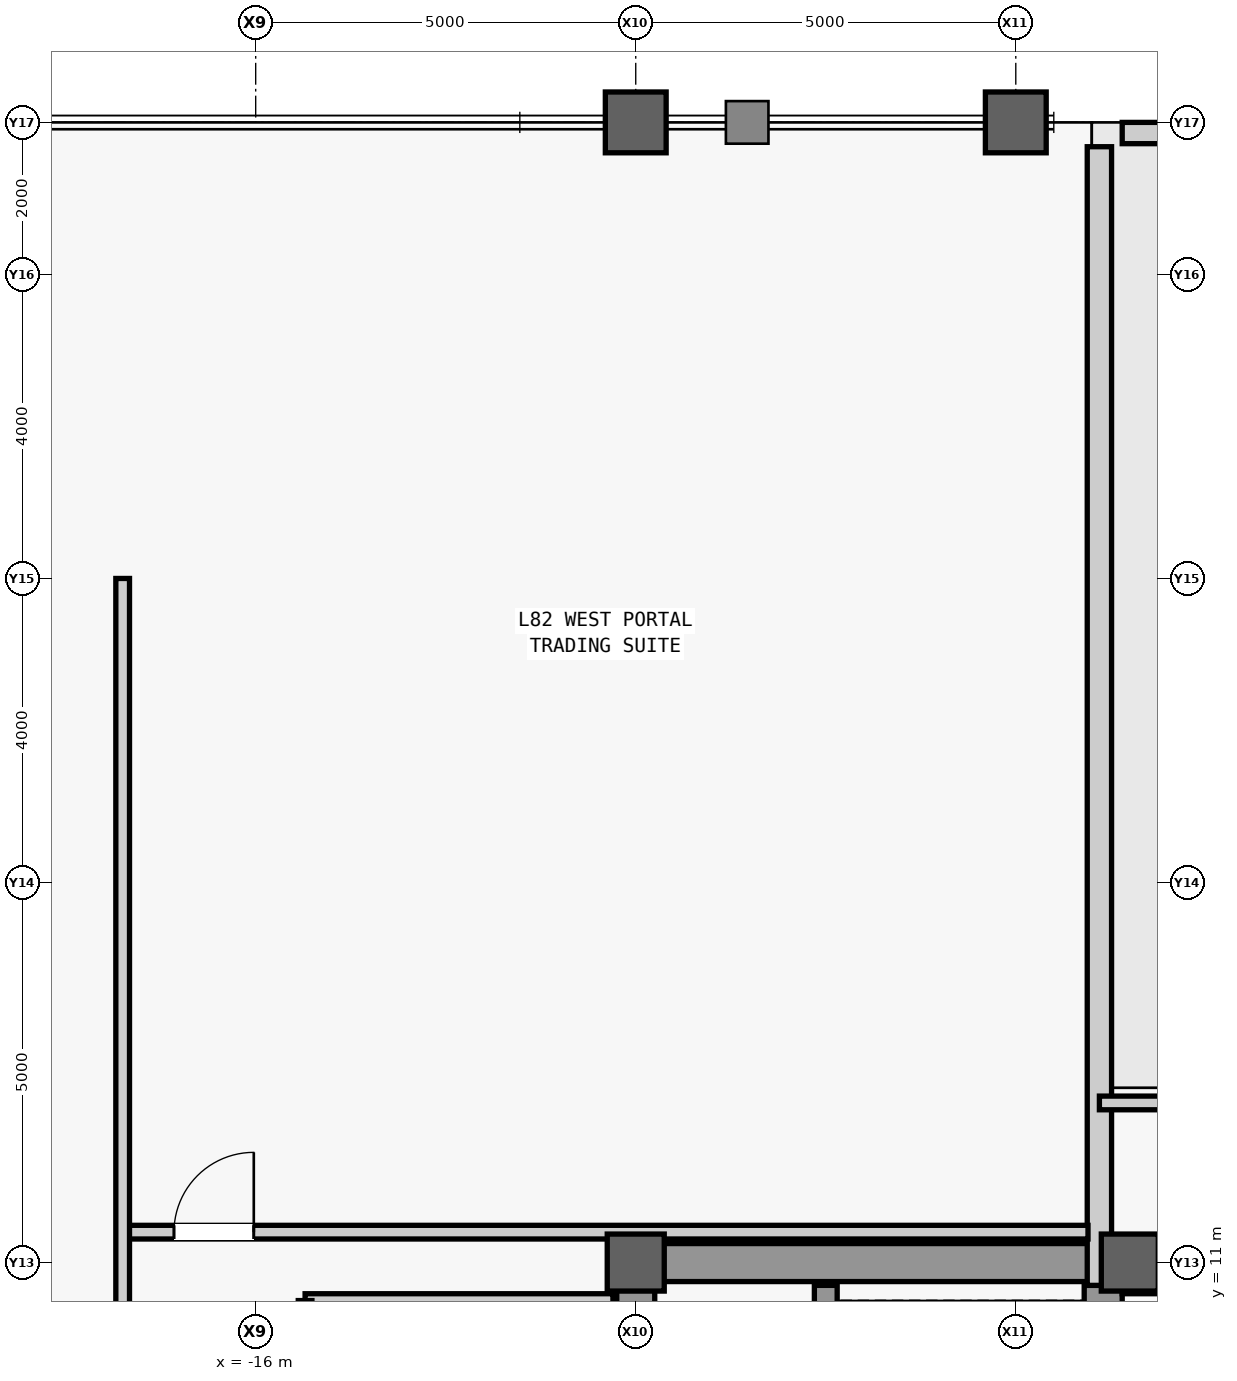
"""IFC4 building model, lengths in metres.
Left out: names, types, materials, properties, quantities, classifications, styles, units other than length and angle.
Written with IfcOpenShell. Run it as: python <this file> out.ifc"""

import sys

from ifc_helpers import new_model, si_unit, direction, frame, frame_2d, origin, origin_2d, place, context, subcontext, project, spatial, rectangle, hollow_rectangle, extrude, source, transform, mapped, element, fill, save


model = new_model("IFC4")
c1 = context("Model", 3, precision=1e-05, world=origin(), true_north=direction((0.0, 1.0)))
c2 = subcontext(c1, "Body", "Model", "MODEL_VIEW")
j1 = project(units=[si_unit("LENGTHUNIT", "METRE"), si_unit("PLANEANGLEUNIT", "RADIAN")], contexts=[c1])
p1 = place(None, origin())
s1 = spatial("IfcSite", under=j1, at=p1, CompositionType="ELEMENT")
p2 = place(p1, origin())
s2 = spatial("IfcBuilding", under=s1, at=p2, CompositionType="ELEMENT")
p3 = place(p2, frame((0.0, 0.0, 346.3)))
s3 = spatial("IfcBuildingStorey", under=s2, at=p3, CompositionType="ELEMENT", Elevation=346.3)
m1 = source(origin(), c2, "Body", "SweptSolid", [
    extrude(rectangle(XDim=22.0, YDim=0.5, at=frame_2d((11.0, 0.0))), origin(), (0.0, 0.0, 1.0), 3.74),
])
p4 = place(p3, frame((-11.0, -11.0, 0.0), z_axis=(0.0, 0.0, 1.0), x_axis=(0.0, 1.0, 0.0)))
e1 = element("IfcWall", 1, at=p4, inside=s3, PredefinedType="SHEAR", context=c2, shape_type="MappedRepresentation", body=[
    mapped(m1, transform((0.0, 0.0, 0.0), scale=1.0)),
])
m2 = source(origin(), c2, "Body", "SweptSolid", [
    extrude(rectangle(XDim=1.1, YDim=2.2, at=frame_2d((0.55, 1.1))), frame((0.0, 0.26, 0.0), z_axis=(0.0, -1.0, 0.0), x_axis=(1.0, 0.0, 0.0)), (0.0, 0.0, 1.0), 0.52),
])
p5 = place(p4, frame((0.8, 0.0, 0.0)))
e2 = element("IfcOpeningElement", 2, at=p5, cuts=e1, PredefinedType="OPENING", context=c2, shape_type="MappedRepresentation", body=[
    mapped(m2, transform((0.0, 0.0, 0.0), scale=1.0)),
])
p6 = place(p4, frame((12.5, 0.0, 0.0)))
e3 = element("IfcOpeningElement", 3, at=p6, cuts=e1, PredefinedType="OPENING", context=c2, shape_type="MappedRepresentation", body=[
    mapped(m2, transform((0.0, 0.0, 0.0), scale=1.0)),
])
m3 = source(origin(), c2, "Body", "SweptSolid", [
    extrude(rectangle(XDim=0.9, YDim=2.15, at=frame_2d((0.45, 1.075))), frame((0.0, 0.26, 0.0), z_axis=(0.0, -1.0, 0.0), x_axis=(1.0, 0.0, 0.0)), (0.0, 0.0, 1.0), 0.52),
])
p7 = place(p4, frame((6.85, 0.0, 0.0)))
e4 = element("IfcOpeningElement", 4, at=p7, cuts=e1, PredefinedType="OPENING", context=c2, shape_type="MappedRepresentation", body=[
    mapped(m3, transform((0.0, 0.0, 0.0), scale=1.0)),
])
m4 = source(origin(), c2, "Body", "SweptSolid", [
    extrude(rectangle(XDim=1.2, YDim=2.3, at=frame_2d((0.6, 1.15))), frame((0.0, 0.26, 0.0), z_axis=(0.0, -1.0, 0.0), x_axis=(1.0, 0.0, 0.0)), (0.0, 0.0, 1.0), 0.52),
])
p8 = place(p4, frame((14.6, 0.0, 0.0)))
e5 = element("IfcOpeningElement", 5, at=p8, cuts=e1, PredefinedType="OPENING", context=c2, shape_type="MappedRepresentation", body=[
    mapped(m4, transform((0.0, 0.0, 0.0), scale=1.0)),
])
p9 = place(p4, frame((18.2, 0.0, 0.0)))
e6 = element("IfcOpeningElement", 6, at=p9, cuts=e1, PredefinedType="OPENING", context=c2, shape_type="MappedRepresentation", body=[
    mapped(m4, transform((0.0, 0.0, 0.0), scale=1.0)),
])
m5 = source(origin(), c2, "Body", "SweptSolid", [
    extrude(rectangle(XDim=1.3, YDim=2.3, at=frame_2d((0.65, 1.15))), frame((0.0, 0.26, 0.0), z_axis=(0.0, -1.0, 0.0), x_axis=(1.0, 0.0, 0.0)), (0.0, 0.0, 1.0), 0.52),
])
p10 = place(p4, frame((2.7, 0.0, 0.0)))
e7 = element("IfcOpeningElement", 7, at=p10, cuts=e1, PredefinedType="OPENING", context=c2, shape_type="MappedRepresentation", body=[
    mapped(m5, transform((0.0, 0.0, 0.0), scale=1.0)),
])
m6 = source(origin(), c2, "Body", "SweptSolid", [
    extrude(rectangle(XDim=21.4, YDim=0.5, at=frame_2d((10.7, 0.0))), origin(), (0.0, 0.0, 1.0), 3.74),
])
p11 = place(p3, frame((-4.85, -10.7, 0.0), z_axis=(0.0, 0.0, 1.0), x_axis=(0.0, 1.0, 0.0)))
e8 = element("IfcWall", 8, at=p11, inside=s3, PredefinedType="SHEAR", context=c2, shape_type="MappedRepresentation", body=[
    mapped(m6, transform((0.0, 0.0, 0.0), scale=1.0)),
])
m7 = source(origin(), c2, "Body", "SweptSolid", [
    extrude(rectangle(XDim=5.9, YDim=0.5, at=frame_2d((2.95, 0.0))), origin(), (0.0, 0.0, 1.0), 3.74),
])
p12 = place(p3, frame((-10.75, 11.0, 0.0), z_axis=(0.0, 0.0, 1.0), x_axis=(1.0, 0.0, 0.0)))
e9 = element("IfcWall", 9, at=p12, inside=s3, PredefinedType="SHEAR", context=c2, shape_type="MappedRepresentation", body=[
    mapped(m7, transform((0.0, 0.0, 0.0), scale=1.0)),
])
m8 = source(origin(), c2, "Body", "SweptSolid", [
    extrude(rectangle(XDim=0.75, YDim=0.75, at=origin_2d()), origin(), (0.0, 0.0, 1.0), 4.0),
])
p13 = place(p3, frame((-11.0, 11.0, 0.0), z_axis=(0.0, 0.0, 1.0), x_axis=(1.0, 0.0, 0.0)))
e10 = element("IfcColumn", 10, at=p13, inside=s3, PredefinedType="COLUMN", context=c2, shape_type="MappedRepresentation", body=[
    mapped(m8, transform((0.0, 0.0, 0.0), scale=1.0)),
])
m9 = source(origin(), c2, "Body", "SweptSolid", [
    extrude(hollow_rectangle(XDim=0.8, YDim=0.8, WallThickness=0.045, at=origin_2d()), origin(), (0.0, 0.0, 1.0), 4.0),
])
for number, where, z_axis, x_axis in (
    (11, (-11.0, 26.0, 0.0), (0.0, 0.0, 1.0), (1.0, 0.0, 0.0)),
    (12, (-6.0, 26.0, 0.0), (0.0, 0.0, 1.0), (1.0, 0.0, 0.0)),
):
    element("IfcColumn", number, at=place(p3, frame(where, z_axis=z_axis, x_axis=x_axis)), inside=s3, PredefinedType="COLUMN", context=c2, shape_type="MappedRepresentation", body=[
        mapped(m9, transform((0.0, 0.0, 0.0), scale=1.0)),
    ])
p14 = place(p3, frame((-4.5, 11.0, 0.0), z_axis=(0.0, 0.0, 1.0), x_axis=(1.0, 0.0, 0.0)))
e13 = element("IfcColumn", 13, at=p14, inside=s3, PredefinedType="COLUMN", context=c2, shape_type="MappedRepresentation", body=[
    mapped(m8, transform((0.0, 0.0, 0.0), scale=1.0)),
])
m10 = source(origin(), c2, "Body", "SweptSolid", [
    extrude(rectangle(XDim=9.2, YDim=0.28, at=frame_2d((4.6, 0.0))), origin(), (0.0, 0.0, 1.0), 1.2),
])
p15 = place(p3, frame((-4.6, 25.86, 0.0), z_axis=(0.0, 0.0, 1.0), x_axis=(1.0, 0.0, 0.0)))
e14 = element("IfcWall", 14, at=p15, inside=s3, PredefinedType="PARAPET", context=c2, shape_type="MappedRepresentation", body=[
    mapped(m10, transform((0.0, 0.0, 0.0), scale=1.0)),
])
m11 = source(origin(), c2, "Body", "SweptSolid", [
    extrude(rectangle(XDim=14.98, YDim=0.32, at=frame_2d((7.49, 0.0))), origin(), (0.0, 0.0, 1.0), 3.045),
])
p16 = place(p3, frame((-4.9, 10.7, 0.0), z_axis=(0.0, 0.0, 1.0), x_axis=(0.0, 1.0, 0.0)))
e15 = element("IfcWall", 15, at=p16, inside=s3, PredefinedType="STANDARD", context=c2, shape_type="MappedRepresentation", body=[
    mapped(m11, transform((0.0, 0.0, 0.0), scale=1.0)),
])
m12 = source(origin(), c2, "Body", "SweptSolid", [
    extrude(rectangle(XDim=7.75, YDim=0.3, at=frame_2d((3.875, 0.0))), origin(), (0.0, 0.0, 1.0), 3.74),
])
p17 = place(p3, frame((-8.5, 2.95, 0.0), z_axis=(0.0, 0.0, 1.0), x_axis=(0.0, 1.0, 0.0)))
e16 = element("IfcWall", 16, at=p17, inside=s3, PredefinedType="SHEAR", context=c2, shape_type="MappedRepresentation", body=[
    mapped(m12, transform((0.0, 0.0, 0.0), scale=1.0)),
])
m13 = source(origin(), c2, "Body", "SweptSolid", [
    extrude(rectangle(XDim=4.05, YDim=0.18, at=frame_2d((2.025, 0.0))), origin(), (0.0, 0.0, 1.0), 3.74),
])
p18 = place(p3, frame((-15.35, 10.5, 0.0), z_axis=(0.0, 0.0, 1.0), x_axis=(1.0, 0.0, 0.0)))
e17 = element("IfcWall", 17, at=p18, inside=s3, PredefinedType="PARTITIONING", context=c2, shape_type="MappedRepresentation", body=[
    mapped(m13, transform((0.0, 0.0, 0.0), scale=1.0)),
])
m14 = source(origin(), c2, "Body", "SweptSolid", [
    extrude(rectangle(XDim=16.6, YDim=0.18, at=frame_2d((8.3, 0.0))), origin(), (0.0, 0.0, 1.0), 3.74),
])
p19 = place(p3, frame((-15.35, -6.1, 0.0), z_axis=(0.0, 0.0, 1.0), x_axis=(0.0, 1.0, 0.0)))
e18 = element("IfcWall", 18, at=p19, inside=s3, PredefinedType="PARTITIONING", context=c2, shape_type="MappedRepresentation", body=[
    mapped(m14, transform((0.0, 0.0, 0.0), scale=1.0)),
])
m15 = source(origin(), c2, "Body", "SweptSolid", [
    extrude(rectangle(XDim=1.8, YDim=2.25, at=frame_2d((0.9, 1.125))), frame((0.0, 0.1, 0.0), z_axis=(0.0, -1.0, 0.0), x_axis=(1.0, 0.0, 0.0)), (0.0, 0.0, 1.0), 0.2),
])
p20 = place(p19, frame((2.7, 0.0, 0.0)))
e19 = element("IfcOpeningElement", 19, at=p20, cuts=e18, PredefinedType="OPENING", context=c2, shape_type="MappedRepresentation", body=[
    mapped(m15, transform((0.0, 0.0, 0.0), scale=1.0)),
])
p21 = place(p19, frame((11.0, 0.0, 0.0)))
e20 = element("IfcOpeningElement", 20, at=p21, cuts=e18, PredefinedType="OPENING", context=c2, shape_type="MappedRepresentation", body=[
    mapped(m15, transform((0.0, 0.0, 0.0), scale=1.0)),
])
m16 = source(origin(), c2, "Body", "SweptSolid", [
    extrude(rectangle(XDim=9.2, YDim=0.22, at=frame_2d((4.6, 0.0))), origin(), (0.0, 0.0, 1.0), 3.74),
])
p22 = place(p3, frame((-4.6, 10.7, 0.0), z_axis=(0.0, 0.0, 1.0), x_axis=(1.0, 0.0, 0.0)))
e21 = element("IfcWall", 21, at=p22, inside=s3, PredefinedType="PARTITIONING", context=c2, shape_type="MappedRepresentation", body=[
    mapped(m16, transform((0.0, 0.0, 0.0), scale=1.0)),
])
m17 = source(origin(), c2, "Body", "SweptSolid", [
    extrude(rectangle(XDim=0.95, YDim=2.15, at=frame_2d((0.475, 1.075))), frame((0.0, 0.12, 0.0), z_axis=(0.0, -1.0, 0.0), x_axis=(1.0, 0.0, 0.0)), (0.0, 0.0, 1.0), 0.24),
])
p23 = place(p22, frame((2.225, 0.0, 0.0)))
e22 = element("IfcOpeningElement", 22, at=p23, cuts=e21, PredefinedType="OPENING", context=c2, shape_type="MappedRepresentation", body=[
    mapped(m17, transform((0.0, 0.0, 0.0), scale=1.0)),
])
p24 = place(p22, frame((6.825, 0.0, 0.0)))
e23 = element("IfcOpeningElement", 23, at=p24, cuts=e21, PredefinedType="OPENING", context=c2, shape_type="MappedRepresentation", body=[
    mapped(m17, transform((0.0, 0.0, 0.0), scale=1.0)),
])
m18 = source(origin(), c2, "Body", "SweptSolid", [
    extrude(rectangle(XDim=9.95, YDim=0.18, at=frame_2d((4.975, 0.0))), origin(), (0.0, 0.0, 1.0), 3.74),
])
p25 = place(p3, frame((-4.9, 13.1, 0.0), z_axis=(0.0, 0.0, 1.0), x_axis=(1.0, 0.0, 0.0)))
e24 = element("IfcWall", 24, at=p25, inside=s3, PredefinedType="PARTITIONING", context=c2, shape_type="MappedRepresentation", body=[
    mapped(m18, transform((0.0, 0.0, 0.0), scale=1.0)),
])
m19 = source(origin(), c2, "Body", "SweptSolid", [
    extrude(rectangle(XDim=12.7, YDim=0.18, at=frame_2d((6.35, 0.0))), origin(), (0.0, 0.0, 1.0), 2.79),
])
p26 = place(p3, frame((-17.75, 11.4, 0.0), z_axis=(0.0, 0.0, 1.0), x_axis=(1.0, 0.0, 0.0)))
e25 = element("IfcWall", 25, at=p26, inside=s3, PredefinedType="PARTITIONING", context=c2, shape_type="MappedRepresentation", body=[
    mapped(m19, transform((0.0, 0.0, 0.0), scale=1.0)),
])
m20 = source(origin(), c2, "Body", "SweptSolid", [
    extrude(rectangle(XDim=1.05, YDim=2.2, at=frame_2d((0.525, 1.1))), frame((0.0, 0.1, 0.0), z_axis=(0.0, -1.0, 0.0), x_axis=(1.0, 0.0, 0.0)), (0.0, 0.0, 1.0), 0.2),
])
p27 = place(p26, frame((0.675, 0.0, 0.0)))
e26 = element("IfcOpeningElement", 26, at=p27, cuts=e25, PredefinedType="OPENING", context=c2, shape_type="MappedRepresentation", body=[
    mapped(m20, transform((0.0, 0.0, 0.0), scale=1.0)),
])
m21 = source(origin(), c2, "Body", "SweptSolid", [
    extrude(rectangle(XDim=40.0, YDim=0.18, at=frame_2d((20.0, 0.0))), origin(), (0.0, 0.0, 1.0), 3.74),
])
p28 = place(p3, frame((-17.75, -20.0, 0.0), z_axis=(0.0, 0.0, 1.0), x_axis=(0.0, 1.0, 0.0)))
e27 = element("IfcWall", 27, at=p28, inside=s3, PredefinedType="PARTITIONING", context=c2, shape_type="MappedRepresentation", body=[
    mapped(m21, transform((0.0, 0.0, 0.0), scale=1.0)),
])
m22 = source(origin(), c2, "Body", "SweptSolid", [
    extrude(rectangle(XDim=0.95, YDim=2.15, at=frame_2d((0.475, 1.075))), frame((0.0, 0.1, 0.0), z_axis=(0.0, -1.0, 0.0), x_axis=(1.0, 0.0, 0.0)), (0.0, 0.0, 1.0), 0.2),
])
p29 = place(p28, frame((11.389, 0.0, 0.0)))
e28 = element("IfcOpeningElement", 28, at=p29, cuts=e27, PredefinedType="OPENING", context=c2, shape_type="MappedRepresentation", body=[
    mapped(m22, transform((0.0, 0.0, 0.0), scale=1.0)),
])
p30 = place(p28, frame((17.473, 0.0, 0.0)))
e29 = element("IfcOpeningElement", 29, at=p30, cuts=e27, PredefinedType="OPENING", context=c2, shape_type="MappedRepresentation", body=[
    mapped(m22, transform((0.0, 0.0, 0.0), scale=1.0)),
])
p31 = place(p28, frame((23.857, 0.0, 0.0)))
e30 = element("IfcOpeningElement", 30, at=p31, cuts=e27, PredefinedType="OPENING", context=c2, shape_type="MappedRepresentation", body=[
    mapped(m22, transform((0.0, 0.0, 0.0), scale=1.0)),
])
p32 = place(p28, frame((28.573, 0.0, 0.0)))
e31 = element("IfcOpeningElement", 31, at=p32, cuts=e27, PredefinedType="OPENING", context=c2, shape_type="MappedRepresentation", body=[
    mapped(m22, transform((0.0, 0.0, 0.0), scale=1.0)),
])
m23 = source(origin(), c2, "Body", "SweptSolid", [
    extrude(rectangle(XDim=1.05, YDim=2.2, at=frame_2d((0.525, 1.1))), frame((0.0, 0.025, 0.0), z_axis=(0.0, -1.0, 0.0), x_axis=(1.0, 0.0, 0.0)), (0.0, 0.0, 1.0), 0.05),
])
p33 = place(p27, origin())
e32 = element("IfcDoor", 32, at=p33, inside=s3, OperationType="SINGLE_SWING_RIGHT", PredefinedType="DOOR", context=c2, shape_type="MappedRepresentation", body=[
    mapped(m23, transform((0.0, 0.0, 0.0), scale=1.0)),
])
fill(e26, e32)
save(model, sys.argv[1])
